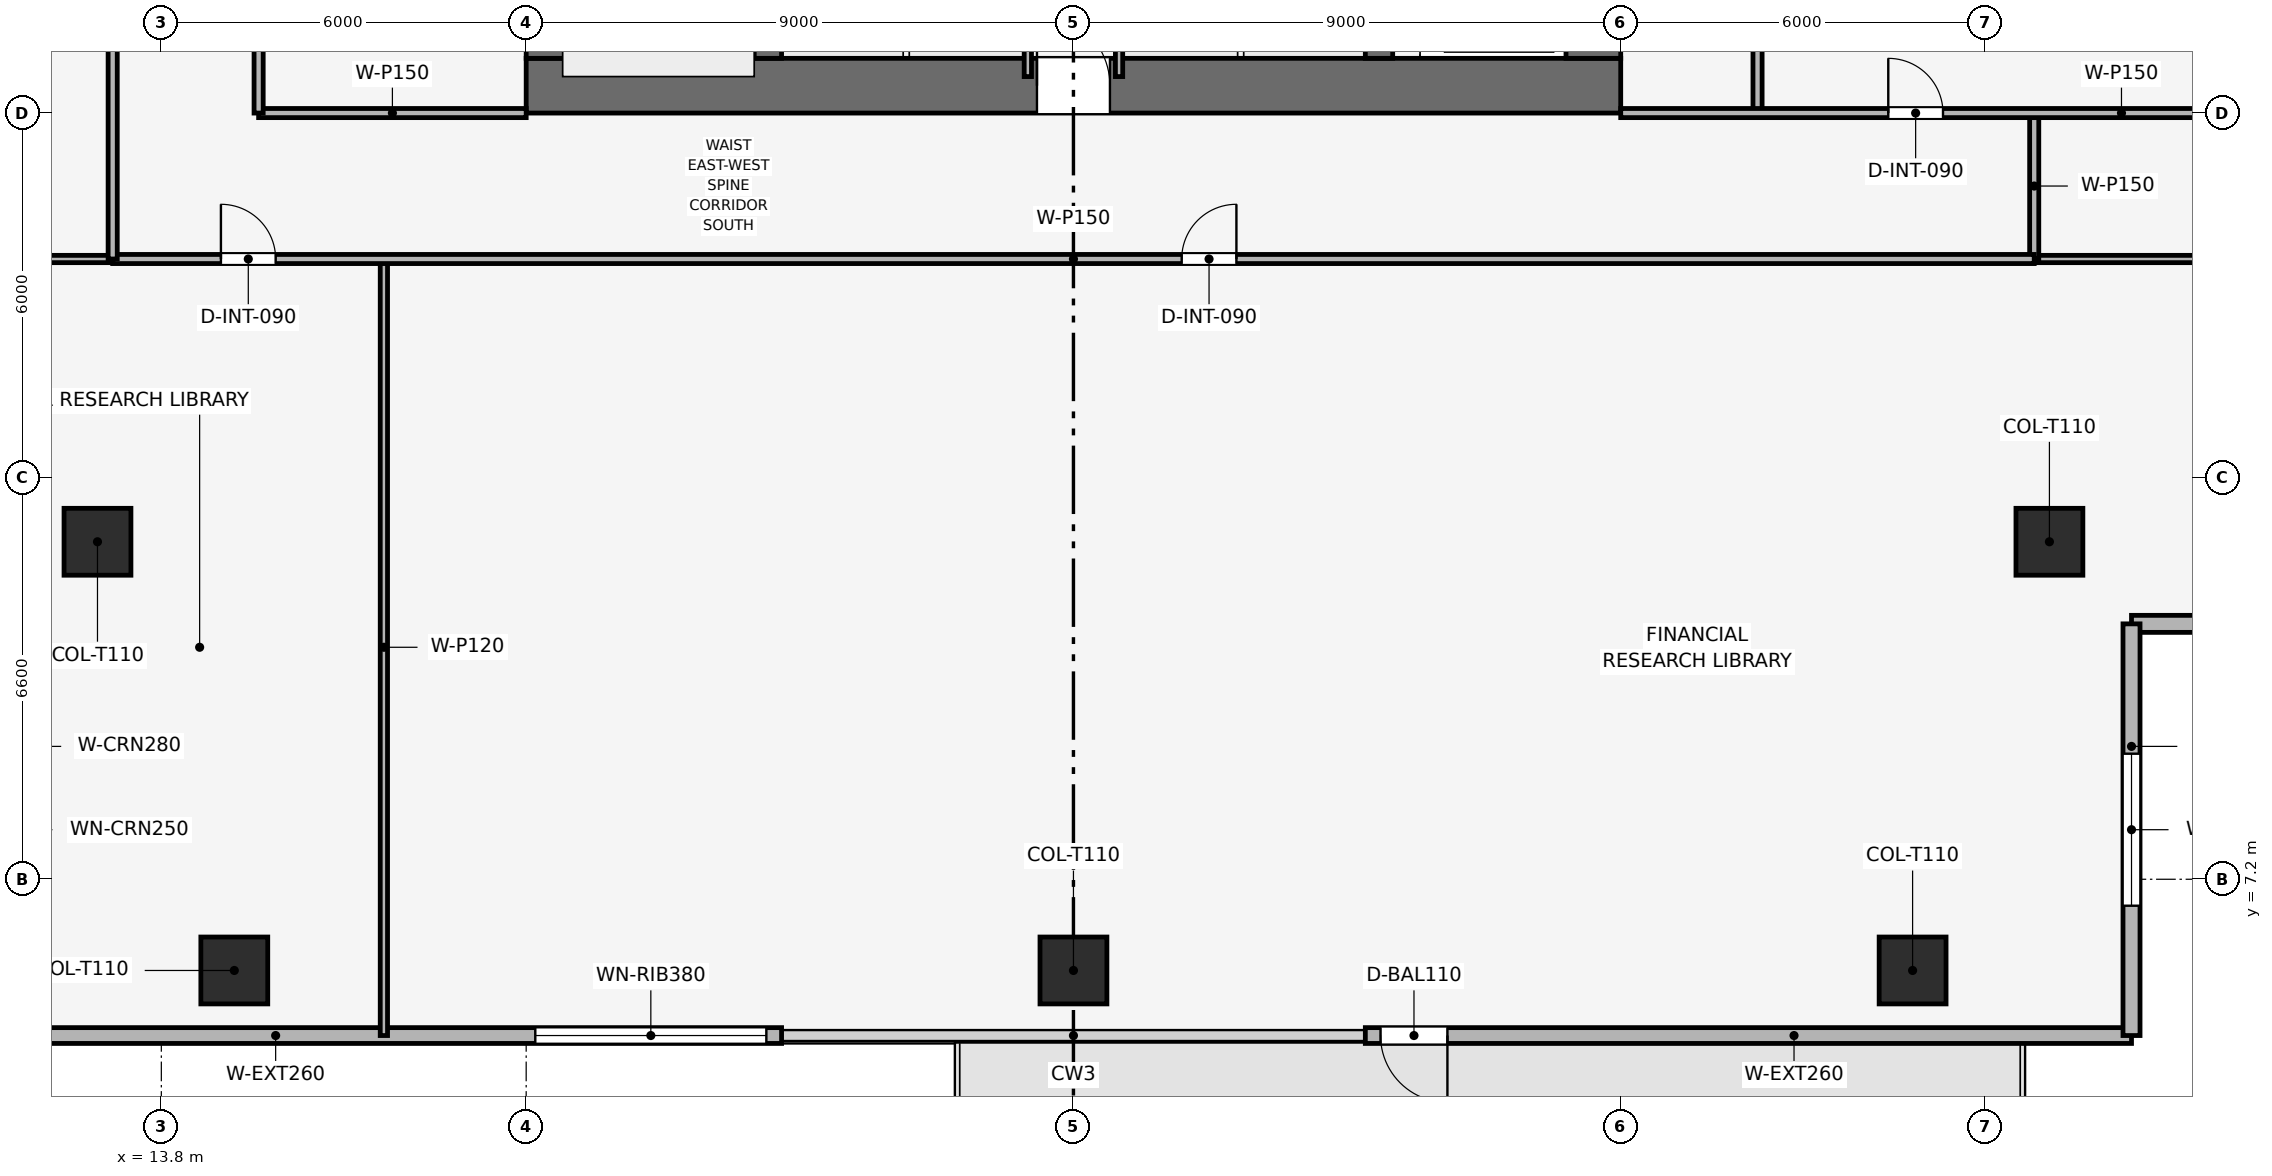
"""IFC4 building model, lengths in metres.
Left out: names, types, materials, properties, quantities, classifications, styles, units other than length and angle.
Written with IfcOpenShell. Run it as: python <this file> out.ifc"""

import sys

from ifc_helpers import new_model, si_unit, direction, frame, frame_2d, origin, origin_2d, place, context, subcontext, project, spatial, rectangle, extrude, element, fill, save


model = new_model("IFC4")
c1 = context("Model", 3, precision=1e-05, world=origin(), true_north=direction((0.0, 1.0)))
c2 = subcontext(c1, "Body", "Model", "MODEL_VIEW")
j1 = project(units=[si_unit("LENGTHUNIT", "METRE"), si_unit("PLANEANGLEUNIT", "RADIAN")], contexts=[c1])
p1 = place(None, origin())
s1 = spatial("IfcSite", under=j1, at=p1, CompositionType="ELEMENT")
p2 = place(p1, origin())
s2 = spatial("IfcBuilding", under=s1, at=p2, CompositionType="ELEMENT")
p3 = place(p2, frame((0.0, 0.0, 145.8)))
s3 = spatial("IfcBuildingStorey", under=s2, at=p3, CompositionType="ELEMENT", Elevation=145.8)
p4 = place(p3, frame((19.8, 20.25, 0.0), z_axis=(0.0, 0.0, 1.0), x_axis=(1.0, 0.0, 0.0)))
e1 = element("IfcWall", 1, at=p4, inside=s3, PredefinedType="SHEAR", context=c2, shape_type="SweptSolid", body=[
    extrude(rectangle(XDim=18.0, YDim=0.9, at=frame_2d((9.0, 0.0))), origin(), (0.0, 0.0, 1.0), 3.75),
])
p5 = place(p4, frame((8.4, 0.0, 0.0)))
e2 = element("IfcOpeningElement", 2, at=p5, cuts=e1, PredefinedType="OPENING", context=c2, shape_type="SweptSolid", body=[
    extrude(rectangle(XDim=1.2, YDim=2.2, at=frame_2d((0.6, 1.1))), frame((0.0, 0.46, 0.0), z_axis=(0.0, -1.0, 0.0), x_axis=(1.0, 0.0, 0.0)), (0.0, 0.0, 1.0), 0.92),
])
p6 = place(p3, frame((20.25, 20.7, 0.0), z_axis=(0.0, 0.0, 1.0), x_axis=(0.0, 1.0, 0.0)))
e3 = element("IfcWall", 3, at=p6, inside=s3, PredefinedType="SHEAR", context=c2, shape_type="SweptSolid", body=[
    extrude(rectangle(XDim=16.2, YDim=0.9, at=frame_2d((8.1, 0.0))), origin(), (0.0, 0.0, 1.0), 3.75),
])
p7 = place(p6, frame((10.1, 0.0, 0.0)))
e4 = element("IfcOpeningElement", 4, at=p7, cuts=e3, PredefinedType="OPENING", context=c2, shape_type="SweptSolid", body=[
    extrude(rectangle(XDim=1.1, YDim=2.15, at=frame_2d((0.55, 1.075))), frame((0.0, 0.46, 0.0), z_axis=(0.0, -1.0, 0.0), x_axis=(1.0, 0.0, 0.0)), (0.0, 0.0, 1.0), 0.92),
])
p8 = place(p3, frame((37.35, 20.7, 0.0), z_axis=(0.0, 0.0, 1.0), x_axis=(0.0, 1.0, 0.0)))
e5 = element("IfcWall", 5, at=p8, inside=s3, PredefinedType="SHEAR", context=c2, shape_type="SweptSolid", body=[
    extrude(rectangle(XDim=16.2, YDim=0.9, at=frame_2d((8.1, 0.0))), origin(), (0.0, 0.0, 1.0), 3.75),
])
p9 = place(p8, frame((4.6, 0.0, 0.0)))
e6 = element("IfcOpeningElement", 6, at=p9, cuts=e5, PredefinedType="OPENING", context=c2, shape_type="SweptSolid", body=[
    extrude(rectangle(XDim=1.1, YDim=2.15, at=frame_2d((0.55, 1.075))), frame((0.0, 0.46, 0.0), z_axis=(0.0, -1.0, 0.0), x_axis=(1.0, 0.0, 0.0)), (0.0, 0.0, 1.0), 0.92),
])
for number, where, z_axis, x_axis in (
    (7, (23.775, 20.7, 0.0), (0.0, 0.0, 1.0), (0.0, 1.0, 0.0)),
    (8, (33.825, 20.7, 0.0), (0.0, 0.0, 1.0), (0.0, 1.0, 0.0)),
):
    element("IfcWall", number, at=place(p3, frame(where, z_axis=z_axis, x_axis=x_axis)), inside=s3, PredefinedType="SHEAR", context=c2, shape_type="SweptSolid", body=[
        extrude(rectangle(XDim=16.2, YDim=0.45, at=frame_2d((8.1, 0.0))), origin(), (0.0, 0.0, 1.0), 3.75),
    ])
for number, where, z_axis, x_axis in (
    (9, (15.0, 5.7, 0.003), (0.0, 0.0, 1.0), (1.0, 0.0, 0.0)),
    (10, (28.8, 5.7, 0.003), (0.0, 0.0, 1.0), (1.0, 0.0, 0.0)),
    (11, (42.6, 5.7, 0.003), (0.0, 0.0, 1.0), (1.0, 0.0, 0.0)),
    (12, (12.75, 12.75, 0.003), (0.0, 0.0, 1.0), (1.0, 0.0, 0.0)),
    (13, (44.85, 12.75, 0.003), (0.0, 0.0, 1.0), (1.0, 0.0, 0.0)),
):
    element("IfcColumn", number, at=place(p3, frame(where, z_axis=z_axis, x_axis=x_axis)), inside=s3, PredefinedType="COLUMN", context=c2, shape_type="SweptSolid", body=[
        extrude(rectangle(XDim=1.1, YDim=1.1, at=origin_2d()), origin(), (0.0, 0.0, 1.0), 3.489),
    ])
p10 = place(p3, frame((46.2, 4.63, 0.0), z_axis=(0.0, 0.0, 1.0), x_axis=(-1.0, 0.0, 0.0)))
e14 = element("IfcWall", 14, at=p10, inside=s3, PredefinedType="SOLIDWALL", context=c2, shape_type="SweptSolid", body=[
    extrude(rectangle(XDim=12.6, YDim=0.26, at=frame_2d((6.3, 0.0))), origin(), (0.0, 0.0, 1.0), 3.495),
])
p11 = place(p10, frame((11.25, 0.0, 0.0)))
e15 = element("IfcOpeningElement", 15, at=p11, cuts=e14, PredefinedType="OPENING", context=c2, shape_type="SweptSolid", body=[
    extrude(rectangle(XDim=1.1, YDim=2.2, at=frame_2d((0.55, 1.1))), frame((0.0, 0.14, 0.0), z_axis=(0.0, -1.0, 0.0), x_axis=(1.0, 0.0, 0.0)), (0.0, 0.0, 1.0), 0.28),
])
p12 = place(p3, frame((24.0, 4.63, 0.0), z_axis=(0.0, 0.0, 1.0), x_axis=(-1.0, 0.0, 0.0)))
e16 = element("IfcWall", 16, at=p12, inside=s3, PredefinedType="SOLIDWALL", context=c2, shape_type="SweptSolid", body=[
    extrude(rectangle(XDim=12.6, YDim=0.26, at=frame_2d((6.3, 0.0))), origin(), (0.0, 0.0, 1.0), 3.495),
])
p13 = place(p12, frame((0.25, 0.0, 0.9)))
e17 = element("IfcOpeningElement", 17, at=p13, cuts=e16, PredefinedType="OPENING", context=c2, shape_type="SweptSolid", body=[
    extrude(rectangle(XDim=3.8, YDim=1.9, at=frame_2d((1.9, 0.95))), frame((0.0, 0.14, 0.0), z_axis=(0.0, -1.0, 0.0), x_axis=(1.0, 0.0, 0.0)), (0.0, 0.0, 1.0), 0.28),
])
p14 = place(p3, frame((52.97, 11.4, 0.0), z_axis=(0.0, 0.0, 1.0), x_axis=(-1.0, 0.0, 0.0)))
e18 = element("IfcWall", 18, at=p14, inside=s3, PredefinedType="SOLIDWALL", context=c2, shape_type="SweptSolid", body=[
    extrude(rectangle(XDim=6.77, YDim=0.28, at=frame_2d((3.385, 0.0))), origin(), (0.0, 0.0, 1.0), 3.495),
])
p15 = place(p14, frame((2.135, 0.0, 0.9)))
e19 = element("IfcOpeningElement", 19, at=p15, cuts=e18, PredefinedType="OPENING", context=c2, shape_type="SweptSolid", body=[
    extrude(rectangle(XDim=2.5, YDim=1.9, at=frame_2d((1.25, 0.95))), frame((0.0, 0.15, 0.0), z_axis=(0.0, -1.0, 0.0), x_axis=(1.0, 0.0, 0.0)), (0.0, 0.0, 1.0), 0.3),
])
p16 = place(p3, frame((46.2, 11.4, 0.0), z_axis=(0.0, 0.0, 1.0), x_axis=(0.0, -1.0, 0.0)))
e20 = element("IfcWall", 20, at=p16, inside=s3, PredefinedType="SOLIDWALL", context=c2, shape_type="SweptSolid", body=[
    extrude(rectangle(XDim=6.77, YDim=0.28, at=frame_2d((3.385, 0.0))), origin(), (0.0, 0.0, 1.0), 3.495),
])
p17 = place(p16, frame((2.135, 0.0, 0.9)))
e21 = element("IfcOpeningElement", 21, at=p17, cuts=e20, PredefinedType="OPENING", context=c2, shape_type="SweptSolid", body=[
    extrude(rectangle(XDim=2.5, YDim=1.9, at=frame_2d((1.25, 0.95))), frame((0.0, 0.15, 0.0), z_axis=(0.0, -1.0, 0.0), x_axis=(1.0, 0.0, 0.0)), (0.0, 0.0, 1.0), 0.3),
])
for number, where, z_axis, x_axis in (
    (22, (28.05, 20.4, 0.0), (0.0, 0.0, 1.0), (0.0, 1.0, 0.0)),
    (23, (29.55, 20.4, 0.0), (0.0, 0.0, 1.0), (0.0, 1.0, 0.0)),
):
    element("IfcWall", number, at=place(p3, frame(where, z_axis=z_axis, x_axis=x_axis)), inside=s3, PredefinedType="PARTITIONING", context=c2, shape_type="SweptSolid", body=[
        extrude(rectangle(XDim=2.75, YDim=0.12, at=frame_2d((1.375, 0.0))), origin(), (0.0, 0.0, 1.0), 3.495),
    ])
p18 = place(p3, frame((15.4, 19.8, 0.0), z_axis=(0.0, 0.0, 1.0), x_axis=(1.0, 0.0, 0.0)))
e24 = element("IfcWall", 24, at=p18, inside=s3, PredefinedType="PARTITIONING", context=c2, shape_type="SweptSolid", body=[
    extrude(rectangle(XDim=4.4, YDim=0.15, at=frame_2d((2.2, 0.0))), origin(), (0.0, 0.0, 1.0), 3.03),
])
p19 = place(p3, frame((15.4, 19.8, 0.0), z_axis=(0.0, 0.0, 1.0), x_axis=(0.0, 1.0, 0.0)))
e25 = element("IfcWall", 25, at=p19, inside=s3, PredefinedType="PARTITIONING", context=c2, shape_type="SweptSolid", body=[
    extrude(rectangle(XDim=10.35, YDim=0.15, at=frame_2d((5.175, 0.0))), origin(), (0.0, 0.0, 1.0), 3.03),
])
p20 = place(p19, frame((1.2, 0.0, 0.0)))
e26 = element("IfcOpeningElement", 26, at=p20, cuts=e25, PredefinedType="OPENING", context=c2, shape_type="SweptSolid", body=[
    extrude(rectangle(XDim=0.9, YDim=2.1, at=frame_2d((0.45, 1.05))), frame((0.0, 0.085, 0.0), z_axis=(0.0, -1.0, 0.0), x_axis=(1.0, 0.0, 0.0)), (0.0, 0.0, 1.0), 0.17),
])
p21 = place(p19, frame((4.7, 0.0, 0.0)))
e27 = element("IfcOpeningElement", 27, at=p21, cuts=e25, PredefinedType="OPENING", context=c2, shape_type="SweptSolid", body=[
    extrude(rectangle(XDim=0.9, YDim=2.1, at=frame_2d((0.45, 1.05))), frame((0.0, 0.085, 0.0), z_axis=(0.0, -1.0, 0.0), x_axis=(1.0, 0.0, 0.0)), (0.0, 0.0, 1.0), 0.17),
])
p22 = place(p19, frame((8.1, 0.0, 0.0)))
e28 = element("IfcOpeningElement", 28, at=p22, cuts=e25, PredefinedType="OPENING", context=c2, shape_type="SweptSolid", body=[
    extrude(rectangle(XDim=0.95, YDim=2.1, at=frame_2d((0.475, 1.05))), frame((0.0, 0.085, 0.0), z_axis=(0.0, -1.0, 0.0), x_axis=(1.0, 0.0, 0.0)), (0.0, 0.0, 1.0), 0.17),
])
p23 = place(p3, frame((40.05, 19.8, 0.0), z_axis=(0.0, 0.0, 1.0), x_axis=(0.0, 1.0, 0.0)))
e29 = element("IfcWall", 29, at=p23, inside=s3, PredefinedType="PARTITIONING", context=c2, shape_type="SweptSolid", body=[
    extrude(rectangle(XDim=7.05, YDim=0.15, at=frame_2d((3.525, 0.0))), origin(), (0.0, 0.0, 1.0), 3.03),
])
p24 = place(p3, frame((17.46, 4.63, 0.0), z_axis=(0.0, 0.0, 1.0), x_axis=(0.0, 1.0, 0.0)))
e30 = element("IfcWall", 30, at=p24, inside=s3, PredefinedType="PARTITIONING", context=c2, shape_type="SweptSolid", body=[
    extrude(rectangle(XDim=12.77, YDim=0.12, at=frame_2d((6.385, 0.0))), origin(), (0.0, 0.0, 1.0), 2.98),
])
p25 = place(p3, frame((4.63, 17.4, 0.0), z_axis=(0.0, 0.0, 1.0), x_axis=(1.0, 0.0, 0.0)))
e31 = element("IfcWall", 31, at=p25, inside=s3, PredefinedType="PARTITIONING", context=c2, shape_type="SweptSolid", body=[
    extrude(rectangle(XDim=8.37, YDim=0.12, at=frame_2d((4.185, 0.0))), origin(), (0.0, 0.0, 1.0), 2.98),
])
p26 = place(p3, frame((44.6, 17.4, 0.0), z_axis=(0.0, 0.0, 1.0), x_axis=(1.0, 0.0, 0.0)))
e32 = element("IfcWall", 32, at=p26, inside=s3, PredefinedType="PARTITIONING", context=c2, shape_type="SweptSolid", body=[
    extrude(rectangle(XDim=8.37, YDim=0.12, at=frame_2d((4.185, 0.0))), origin(), (0.0, 0.0, 1.0), 2.98),
])
p27 = place(p3, frame((44.6, 17.4, 0.0), z_axis=(0.0, 0.0, 1.0), x_axis=(0.0, 1.0, 0.0)))
e33 = element("IfcWall", 33, at=p27, inside=s3, PredefinedType="PARTITIONING", context=c2, shape_type="SweptSolid", body=[
    extrude(rectangle(XDim=2.4, YDim=0.15, at=frame_2d((1.2, 0.0))), origin(), (0.0, 0.0, 1.0), 3.495),
])
p28 = place(p3, frame((37.8, 19.8, 0.0), z_axis=(0.0, 0.0, 1.0), x_axis=(1.0, 0.0, 0.0)))
e34 = element("IfcWall", 34, at=p28, inside=s3, PredefinedType="PARTITIONING", context=c2, shape_type="SweptSolid", body=[
    extrude(rectangle(XDim=15.17, YDim=0.15, at=frame_2d((7.585, 0.0))), origin(), (0.0, 0.0, 1.0), 2.98),
])
p29 = place(p28, frame((4.4, 0.0, 0.0)))
e35 = element("IfcOpeningElement", 35, at=p29, cuts=e34, PredefinedType="OPENING", context=c2, shape_type="SweptSolid", body=[
    extrude(rectangle(XDim=0.9, YDim=2.1, at=frame_2d((0.45, 1.05))), frame((0.0, 0.085, 0.0), z_axis=(0.0, -1.0, 0.0), x_axis=(1.0, 0.0, 0.0)), (0.0, 0.0, 1.0), 0.17),
])
p30 = place(p3, frame((13.0, 17.4, 0.0), z_axis=(0.0, 0.0, 1.0), x_axis=(1.0, 0.0, 0.0)))
e36 = element("IfcWall", 36, at=p30, inside=s3, PredefinedType="PARTITIONING", context=c2, shape_type="SweptSolid", body=[
    extrude(rectangle(XDim=31.6, YDim=0.15, at=frame_2d((15.8, 0.0))), origin(), (0.0, 0.0, 1.0), 3.03),
])
p31 = place(p30, frame((1.78, 0.0, 0.0)))
e37 = element("IfcOpeningElement", 37, at=p31, cuts=e36, PredefinedType="OPENING", context=c2, shape_type="SweptSolid", body=[
    extrude(rectangle(XDim=0.9, YDim=2.1, at=frame_2d((0.45, 1.05))), frame((0.0, 0.085, 0.0), z_axis=(0.0, -1.0, 0.0), x_axis=(1.0, 0.0, 0.0)), (0.0, 0.0, 1.0), 0.17),
])
p32 = place(p30, frame((17.58, 0.0, 0.0)))
e38 = element("IfcOpeningElement", 38, at=p32, cuts=e36, PredefinedType="OPENING", context=c2, shape_type="SweptSolid", body=[
    extrude(rectangle(XDim=0.9, YDim=2.1, at=frame_2d((0.45, 1.05))), frame((0.0, 0.085, 0.0), z_axis=(0.0, -1.0, 0.0), x_axis=(1.0, 0.0, 0.0)), (0.0, 0.0, 1.0), 0.17),
])
p33 = place(p3, frame((13.0, 17.4, 0.0), z_axis=(0.0, 0.0, 1.0), x_axis=(0.0, 1.0, 0.0)))
e39 = element("IfcWall", 39, at=p33, inside=s3, PredefinedType="PARTITIONING", context=c2, shape_type="SweptSolid", body=[
    extrude(rectangle(XDim=22.8, YDim=0.15, at=frame_2d((11.4, 0.0))), origin(), (0.0, 0.0, 1.0), 3.03),
])
p34 = place(p33, frame((6.115, 0.0, 0.0)))
e40 = element("IfcOpeningElement", 40, at=p34, cuts=e39, PredefinedType="OPENING", context=c2, shape_type="SweptSolid", body=[
    extrude(rectangle(XDim=0.9, YDim=2.1, at=frame_2d((0.45, 1.05))), frame((0.0, 0.085, 0.0), z_axis=(0.0, -1.0, 0.0), x_axis=(1.0, 0.0, 0.0)), (0.0, 0.0, 1.0), 0.17),
])
p35 = place(p33, frame((15.115, 0.0, 0.0)))
e41 = element("IfcOpeningElement", 41, at=p35, cuts=e39, PredefinedType="OPENING", context=c2, shape_type="SweptSolid", body=[
    extrude(rectangle(XDim=0.9, YDim=2.1, at=frame_2d((0.45, 1.05))), frame((0.0, 0.085, 0.0), z_axis=(0.0, -1.0, 0.0), x_axis=(1.0, 0.0, 0.0)), (0.0, 0.0, 1.0), 0.17),
])
p36 = place(p11, origin())
e42 = element("IfcDoor", 42, at=p36, inside=s3, OperationType="SINGLE_SWING_LEFT", PredefinedType="DOOR", context=c2, shape_type="SweptSolid", body=[
    extrude(rectangle(XDim=1.1, YDim=2.2, at=frame_2d((0.55, 1.1))), frame((0.0, 0.025, 0.0), z_axis=(0.0, -1.0, 0.0), x_axis=(1.0, 0.0, 0.0)), (0.0, 0.0, 1.0), 0.05),
])
fill(e15, e42)
p37 = place(p13, origin())
e43 = element("IfcWindow", 43, at=p37, inside=s3, PartitioningType="SINGLE_PANEL", PredefinedType="WINDOW", context=c2, shape_type="SweptSolid", body=[
    extrude(rectangle(XDim=3.8, YDim=1.9, at=frame_2d((1.9, 0.95))), frame((0.0, 0.03, 0.0), z_axis=(0.0, -1.0, 0.0), x_axis=(1.0, 0.0, 0.0)), (0.0, 0.0, 1.0), 0.06),
])
fill(e17, e43)
p38 = place(p17, origin())
e44 = element("IfcWindow", 44, at=p38, inside=s3, PartitioningType="SINGLE_PANEL", PredefinedType="WINDOW", context=c2, shape_type="SweptSolid", body=[
    extrude(rectangle(XDim=2.5, YDim=1.9, at=frame_2d((1.25, 0.95))), frame((0.0, 0.03, 0.0), z_axis=(0.0, -1.0, 0.0), x_axis=(1.0, 0.0, 0.0)), (0.0, 0.0, 1.0), 0.06),
])
fill(e21, e44)
p39 = place(p29, origin())
e45 = element("IfcDoor", 45, at=p39, inside=s3, OperationType="SINGLE_SWING_LEFT", PredefinedType="DOOR", context=c2, shape_type="SweptSolid", body=[
    extrude(rectangle(XDim=0.9, YDim=2.1, at=frame_2d((0.45, 1.05))), frame((0.0, 0.025, 0.0), z_axis=(0.0, -1.0, 0.0), x_axis=(1.0, 0.0, 0.0)), (0.0, 0.0, 1.0), 0.05),
])
fill(e35, e45)
p40 = place(p31, origin())
e46 = element("IfcDoor", 46, at=p40, inside=s3, OperationType="SINGLE_SWING_LEFT", PredefinedType="DOOR", context=c2, shape_type="SweptSolid", body=[
    extrude(rectangle(XDim=0.9, YDim=2.1, at=frame_2d((0.45, 1.05))), frame((0.0, 0.025, 0.0), z_axis=(0.0, -1.0, 0.0), x_axis=(1.0, 0.0, 0.0)), (0.0, 0.0, 1.0), 0.05),
])
fill(e37, e46)
p41 = place(p32, origin())
e47 = element("IfcDoor", 47, at=p41, inside=s3, OperationType="SINGLE_SWING_RIGHT", PredefinedType="DOOR", context=c2, shape_type="SweptSolid", body=[
    extrude(rectangle(XDim=0.9, YDim=2.1, at=frame_2d((0.45, 1.05))), frame((0.0, 0.025, 0.0), z_axis=(0.0, -1.0, 0.0), x_axis=(1.0, 0.0, 0.0)), (0.0, 0.0, 1.0), 0.05),
])
fill(e38, e47)
p42 = place(p5, origin())
e48 = element("IfcDoor", 48, at=p42, inside=s3, OperationType="SINGLE_SWING_LEFT", PredefinedType="DOOR", context=c2, shape_type="SweptSolid", body=[
    extrude(rectangle(XDim=1.2, YDim=2.2, at=frame_2d((0.6, 1.1))), frame((0.0, 0.025, 0.0), z_axis=(0.0, -1.0, 0.0), x_axis=(1.0, 0.0, 0.0)), (0.0, 0.0, 1.0), 0.05),
])
fill(e2, e48)
save(model, sys.argv[1])
